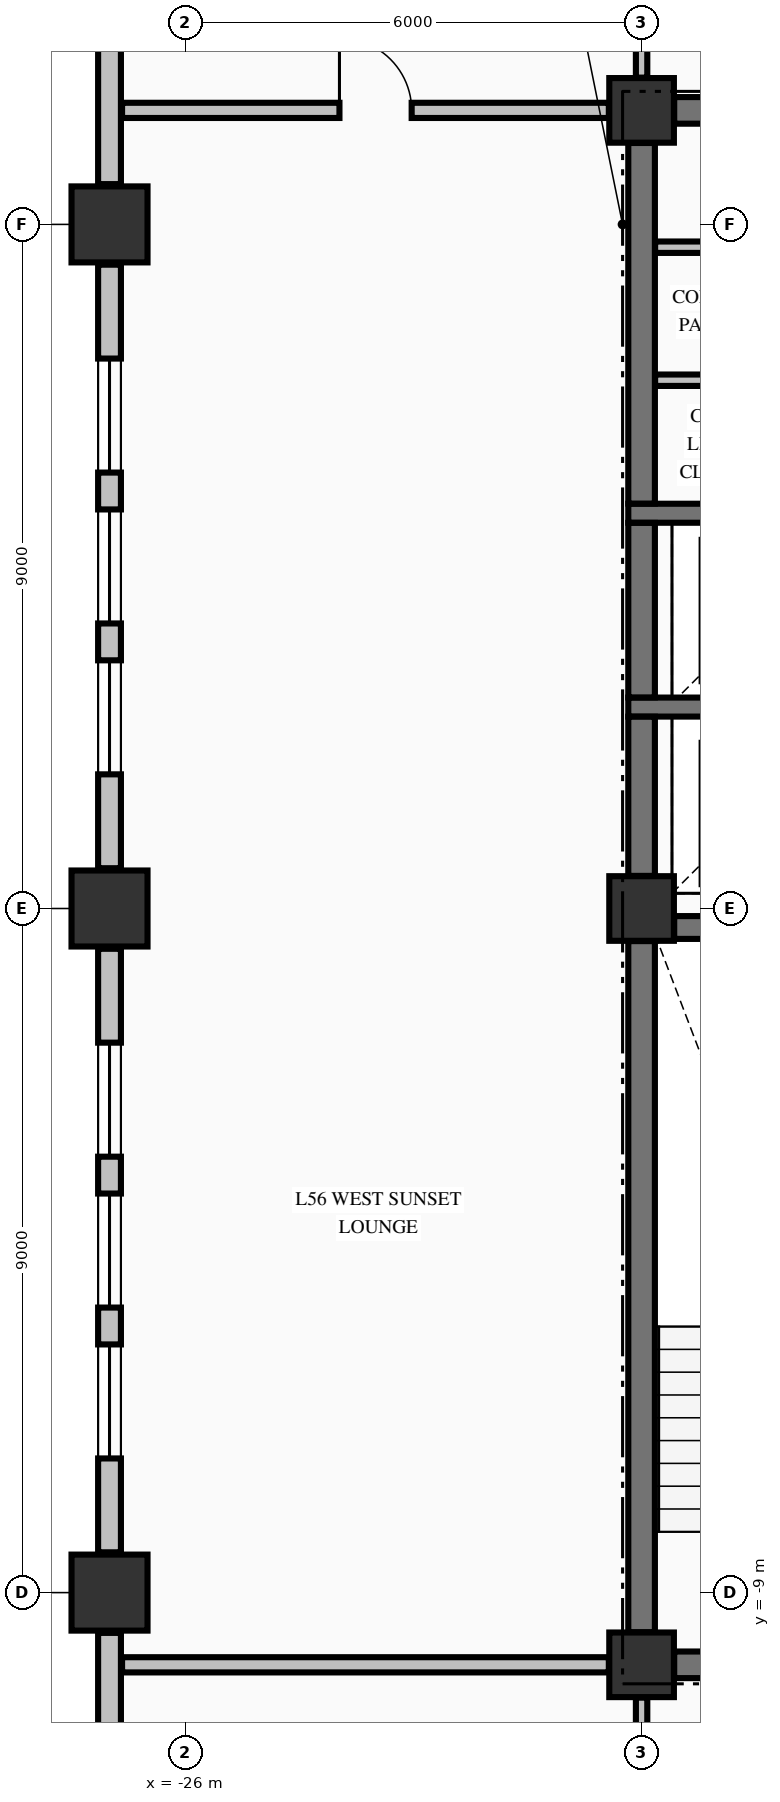
"""IFC4 building model, lengths in metres.
Left out: names, types, materials, properties, quantities, classifications, styles, units other than length and angle.
Written with IfcOpenShell. Run it as: python <this file> out.ifc"""

import sys

from ifc_helpers import new_model, si_unit, direction, frame, frame_2d, origin, origin_2d, place, context, subcontext, project, spatial, rectangle, extrude, element, fill, save


model = new_model("IFC4")
c1 = context("Model", 3, precision=1e-05, world=origin(), true_north=direction((0.0, 1.0)))
c2 = subcontext(c1, "Body", "Model", "MODEL_VIEW")
j1 = project(units=[si_unit("LENGTHUNIT", "METRE"), si_unit("PLANEANGLEUNIT", "RADIAN")], contexts=[c1])
p1 = place(None, origin())
s1 = spatial("IfcSite", under=j1, at=p1, CompositionType="ELEMENT")
p2 = place(p1, origin())
s2 = spatial("IfcBuilding", under=s1, at=p2, CompositionType="ELEMENT")
p3 = place(p2, frame((0.0, 0.0, 215.26)))
s3 = spatial("IfcBuildingStorey", under=s2, at=p3, CompositionType="ELEMENT", Elevation=215.26)
for number, where, z_axis, x_axis in (
    (1, (-27.0, -9.0, -0.25), (0.0, 0.0, 1.0), (1.0, 0.0, 0.0)),
    (2, (-27.0, 0.0, -0.25), (0.0, 0.0, 1.0), (1.0, 0.0, 0.0)),
    (3, (-27.0, 9.0, -0.25), (0.0, 0.0, 1.0), (1.0, 0.0, 0.0)),
):
    element("IfcColumn", number, at=place(p3, frame(where, z_axis=z_axis, x_axis=x_axis)), inside=s3, PredefinedType="COLUMN", context=c2, shape_type="SweptSolid", body=[
        extrude(rectangle(XDim=1.0, YDim=1.0, at=origin_2d()), origin(), (0.0, 0.0, 1.0), 3.4),
    ])
for number, where, z_axis, x_axis in (
    (4, (-20.0, -9.95, -0.25), (0.0, 0.0, 1.0), (1.0, 0.0, 0.0)),
    (5, (-20.0, 10.5, -0.25), (0.0, 0.0, 1.0), (1.0, 0.0, 0.0)),
    (6, (-20.0, 0.0, -0.25), (0.0, 0.0, 1.0), (1.0, 0.0, 0.0)),
):
    element("IfcColumn", number, at=place(p3, frame(where, z_axis=z_axis, x_axis=x_axis)), inside=s3, PredefinedType="COLUMN", context=c2, shape_type="SweptSolid", body=[
        extrude(rectangle(XDim=0.85, YDim=0.85, at=origin_2d()), origin(), (0.0, 0.0, 1.0), 3.4),
    ])
p4 = place(p3, frame((-27.0, -9.53, 0.0), z_axis=(0.0, 0.0, 1.0), x_axis=(0.0, -1.0, 0.0)))
e7 = element("IfcWall", 7, at=p4, inside=s3, PredefinedType="STANDARD", context=c2, shape_type="SweptSolid", body=[
    extrude(rectangle(XDim=9.44, YDim=0.3, at=frame_2d((4.72, 0.0))), origin(), (0.0, 0.0, 1.0), 2.542),
])
p5 = place(p3, frame((-27.0, -0.53, 0.0), z_axis=(0.0, 0.0, 1.0), x_axis=(0.0, -1.0, 0.0)))
e8 = element("IfcWall", 8, at=p5, inside=s3, PredefinedType="STANDARD", context=c2, shape_type="SweptSolid", body=[
    extrude(rectangle(XDim=7.94, YDim=0.3, at=frame_2d((3.97, 0.0))), origin(), (0.0, 0.0, 1.0), 2.542),
])
p6 = place(p5, frame((1.235, 0.0, 0.72)))
e9 = element("IfcOpeningElement", 9, at=p6, cuts=e8, PredefinedType="OPENING", context=c2, shape_type="SweptSolid", body=[
    extrude(rectangle(XDim=1.5, YDim=1.6, at=frame_2d((0.75, 0.8))), frame((0.0, 0.16, 0.0), z_axis=(0.0, -1.0, 0.0), x_axis=(1.0, 0.0, 0.0)), (0.0, 0.0, 1.0), 0.32),
])
p7 = place(p5, frame((3.22, 0.0, 0.72)))
e10 = element("IfcOpeningElement", 10, at=p7, cuts=e8, PredefinedType="OPENING", context=c2, shape_type="SweptSolid", body=[
    extrude(rectangle(XDim=1.5, YDim=1.6, at=frame_2d((0.75, 0.8))), frame((0.0, 0.16, 0.0), z_axis=(0.0, -1.0, 0.0), x_axis=(1.0, 0.0, 0.0)), (0.0, 0.0, 1.0), 0.32),
])
p8 = place(p5, frame((5.205, 0.0, 0.72)))
e11 = element("IfcOpeningElement", 11, at=p8, cuts=e8, PredefinedType="OPENING", context=c2, shape_type="SweptSolid", body=[
    extrude(rectangle(XDim=1.5, YDim=1.6, at=frame_2d((0.75, 0.8))), frame((0.0, 0.16, 0.0), z_axis=(0.0, -1.0, 0.0), x_axis=(1.0, 0.0, 0.0)), (0.0, 0.0, 1.0), 0.32),
])
p9 = place(p3, frame((-27.0, 8.47, 0.0), z_axis=(0.0, 0.0, 1.0), x_axis=(0.0, -1.0, 0.0)))
e12 = element("IfcWall", 12, at=p9, inside=s3, PredefinedType="STANDARD", context=c2, shape_type="SweptSolid", body=[
    extrude(rectangle(XDim=7.94, YDim=0.3, at=frame_2d((3.97, 0.0))), origin(), (0.0, 0.0, 1.0), 2.542),
])
p10 = place(p9, frame((1.235, 0.0, 0.72)))
e13 = element("IfcOpeningElement", 13, at=p10, cuts=e12, PredefinedType="OPENING", context=c2, shape_type="SweptSolid", body=[
    extrude(rectangle(XDim=1.5, YDim=1.6, at=frame_2d((0.75, 0.8))), frame((0.0, 0.16, 0.0), z_axis=(0.0, -1.0, 0.0), x_axis=(1.0, 0.0, 0.0)), (0.0, 0.0, 1.0), 0.32),
])
p11 = place(p9, frame((3.22, 0.0, 0.72)))
e14 = element("IfcOpeningElement", 14, at=p11, cuts=e12, PredefinedType="OPENING", context=c2, shape_type="SweptSolid", body=[
    extrude(rectangle(XDim=1.5, YDim=1.6, at=frame_2d((0.75, 0.8))), frame((0.0, 0.16, 0.0), z_axis=(0.0, -1.0, 0.0), x_axis=(1.0, 0.0, 0.0)), (0.0, 0.0, 1.0), 0.32),
])
p12 = place(p9, frame((5.205, 0.0, 0.72)))
e15 = element("IfcOpeningElement", 15, at=p12, cuts=e12, PredefinedType="OPENING", context=c2, shape_type="SweptSolid", body=[
    extrude(rectangle(XDim=1.5, YDim=1.6, at=frame_2d((0.75, 0.8))), frame((0.0, 0.16, 0.0), z_axis=(0.0, -1.0, 0.0), x_axis=(1.0, 0.0, 0.0)), (0.0, 0.0, 1.0), 0.32),
])
p13 = place(p3, frame((-27.0, 18.97, 0.0), z_axis=(0.0, 0.0, 1.0), x_axis=(0.0, -1.0, 0.0)))
e16 = element("IfcWall", 16, at=p13, inside=s3, PredefinedType="STANDARD", context=c2, shape_type="SweptSolid", body=[
    extrude(rectangle(XDim=9.44, YDim=0.3, at=frame_2d((4.72, 0.0))), origin(), (0.0, 0.0, 1.0), 2.542),
])
p14 = place(p3, frame((-19.571, -9.95, 0.0), z_axis=(0.0, 0.0, 1.0), x_axis=(1.0, 0.0, 0.0)))
e17 = element("IfcWall", 17, at=p14, inside=s3, PredefinedType="SHEAR", context=c2, shape_type="SweptSolid", body=[
    extrude(rectangle(XDim=4.871, YDim=0.35, at=frame_2d((2.436, 0.0))), origin(), (0.0, 0.0, 1.0), 3.15),
])
p15 = place(p14, frame((0.746, 0.0, 0.0)))
e18 = element("IfcOpeningElement", 18, at=p15, cuts=e17, PredefinedType="OPENING", context=c2, shape_type="SweptSolid", body=[
    extrude(rectangle(XDim=1.05, YDim=2.15, at=frame_2d((0.525, 1.075))), frame((0.0, 0.185, 0.0), z_axis=(0.0, -1.0, 0.0), x_axis=(1.0, 0.0, 0.0)), (0.0, 0.0, 1.0), 0.37),
])
p16 = place(p3, frame((-19.571, -0.25, 0.0), z_axis=(0.0, 0.0, 1.0), x_axis=(1.0, 0.0, 0.0)))
e19 = element("IfcWall", 19, at=p16, inside=s3, PredefinedType="SHEAR", context=c2, shape_type="SweptSolid", body=[
    extrude(rectangle(XDim=8.142, YDim=0.3, at=frame_2d((4.071, 0.0))), origin(), (0.0, 0.0, 1.0), 3.15),
])
p17 = place(p16, frame((5.871, 0.0, 0.0)))
e20 = element("IfcOpeningElement", 20, at=p17, cuts=e19, PredefinedType="OPENING", context=c2, shape_type="SweptSolid", body=[
    extrude(rectangle(XDim=1.1, YDim=2.15, at=frame_2d((0.55, 1.075))), frame((0.0, 0.16, 0.0), z_axis=(0.0, -1.0, 0.0), x_axis=(1.0, 0.0, 0.0)), (0.0, 0.0, 1.0), 0.32),
])
for number, where, z_axis, x_axis in (
    (21, (-20.175, 2.65, 0.0), (0.0, 0.0, 1.0), (1.0, 0.0, 0.0)),
    (22, (-20.175, 5.2, 0.0), (0.0, 0.0, 1.0), (1.0, 0.0, 0.0)),
):
    element("IfcWall", number, at=place(p3, frame(where, z_axis=z_axis, x_axis=x_axis)), inside=s3, PredefinedType="SOLIDWALL", context=c2, shape_type="SweptSolid", body=[
        extrude(rectangle(XDim=3.2, YDim=0.25, at=frame_2d((1.6, 0.0))), origin(), (0.0, 0.0, 1.0), 3.15),
    ])
p18 = place(p3, frame((-19.571, 10.5, 0.0), z_axis=(0.0, 0.0, 1.0), x_axis=(1.0, 0.0, 0.0)))
e23 = element("IfcWall", 23, at=p18, inside=s3, PredefinedType="SHEAR", context=c2, shape_type="SweptSolid", body=[
    extrude(rectangle(XDim=4.871, YDim=0.35, at=frame_2d((2.436, 0.0))), origin(), (0.0, 0.0, 1.0), 3.15),
])
p19 = place(p18, frame((3.121, 0.0, 0.0)))
e24 = element("IfcOpeningElement", 24, at=p19, cuts=e23, PredefinedType="OPENING", context=c2, shape_type="SweptSolid", body=[
    extrude(rectangle(XDim=1.1, YDim=2.15, at=frame_2d((0.55, 1.075))), frame((0.0, 0.185, 0.0), z_axis=(0.0, -1.0, 0.0), x_axis=(1.0, 0.0, 0.0)), (0.0, 0.0, 1.0), 0.37),
])
p20 = place(p3, frame((-26.835, -9.95, 0.0), z_axis=(0.0, 0.0, 1.0), x_axis=(1.0, 0.0, 0.0)))
e25 = element("IfcWall", 25, at=p20, inside=s3, PredefinedType="PARTITIONING", context=c2, shape_type="SweptSolid", body=[
    extrude(rectangle(XDim=6.404, YDim=0.2, at=frame_2d((3.202, 0.0))), origin(), (0.0, 0.0, 1.0), 3.15),
])
for number, where, z_axis, x_axis in (
    (26, (-19.822, 6.95, 0.0), (0.0, 0.0, 1.0), (1.0, 0.0, 0.0)),
    (27, (-19.822, 8.7, 0.0), (0.0, 0.0, 1.0), (1.0, 0.0, 0.0)),
):
    element("IfcWall", number, at=place(p3, frame(where, z_axis=z_axis, x_axis=x_axis)), inside=s3, PredefinedType="PARTITIONING", context=c2, shape_type="SweptSolid", body=[
        extrude(rectangle(XDim=2.822, YDim=0.15, at=frame_2d((1.411, 0.0))), origin(), (0.0, 0.0, 1.0), 3.15),
    ])
p21 = place(p3, frame((-26.835, 10.5, 0.0), z_axis=(0.0, 0.0, 1.0), x_axis=(1.0, 0.0, 0.0)))
e28 = element("IfcWall", 28, at=p21, inside=s3, PredefinedType="PARTITIONING", context=c2, shape_type="SweptSolid", body=[
    extrude(rectangle(XDim=6.404, YDim=0.2, at=frame_2d((3.202, 0.0))), origin(), (0.0, 0.0, 1.0), 3.15),
])
p22 = place(p21, frame((2.86, 0.0, 0.0)))
e29 = element("IfcOpeningElement", 29, at=p22, cuts=e28, PredefinedType="OPENING", context=c2, shape_type="SweptSolid", body=[
    extrude(rectangle(XDim=0.95, YDim=2.15, at=frame_2d((0.475, 1.075))), frame((0.0, 0.11, 0.0), z_axis=(0.0, -1.0, 0.0), x_axis=(1.0, 0.0, 0.0)), (0.0, 0.0, 1.0), 0.22),
])
p23 = place(p3, frame((-20.0, -9.521, 0.0), z_axis=(0.0, 0.0, 1.0), x_axis=(0.0, 1.0, 0.0)))
e30 = element("IfcWall", 30, at=p23, inside=s3, PredefinedType="SHEAR", context=c2, shape_type="SweptSolid", body=[
    extrude(rectangle(XDim=9.092, YDim=0.35, at=frame_2d((4.546, 0.0))), origin(), (0.0, 0.0, 1.0), 3.15),
])
p24 = place(p3, frame((-20.0, 0.429, 0.0), z_axis=(0.0, 0.0, 1.0), x_axis=(0.0, 1.0, 0.0)))
e31 = element("IfcWall", 31, at=p24, inside=s3, PredefinedType="SHEAR", context=c2, shape_type="SweptSolid", body=[
    extrude(rectangle(XDim=2.094, YDim=0.35, at=frame_2d((1.047, 0.0))), origin(), (0.0, 0.0, 1.0), 3.15),
])
p25 = place(p3, frame((-20.0, 2.777, 0.0), z_axis=(0.0, 0.0, 1.0), x_axis=(0.0, 1.0, 0.0)))
e32 = element("IfcWall", 32, at=p25, inside=s3, PredefinedType="SHEAR", context=c2, shape_type="SweptSolid", body=[
    extrude(rectangle(XDim=2.296, YDim=0.35, at=frame_2d((1.148, 0.0))), origin(), (0.0, 0.0, 1.0), 3.15),
])
p26 = place(p3, frame((-20.0, 5.327, 0.0), z_axis=(0.0, 0.0, 1.0), x_axis=(0.0, 1.0, 0.0)))
e33 = element("IfcWall", 33, at=p26, inside=s3, PredefinedType="SHEAR", context=c2, shape_type="SweptSolid", body=[
    extrude(rectangle(XDim=4.744, YDim=0.35, at=frame_2d((2.372, 0.0))), origin(), (0.0, 0.0, 1.0), 3.15),
])
p27 = place(p3, frame((-20.0, -12.697, 0.0), z_axis=(0.0, 0.0, 1.0), x_axis=(0.0, 1.0, 0.0)))
e34 = element("IfcWall", 34, at=p27, inside=s3, PredefinedType="PARTITIONING", context=c2, shape_type="SweptSolid", body=[
    extrude(rectangle(XDim=2.316, YDim=0.15, at=frame_2d((1.158, 0.0))), origin(), (0.0, 0.0, 1.0), 2.342),
])
p28 = place(p3, frame((-20.0, 10.931, 0.0), z_axis=(0.0, 0.0, 1.0), x_axis=(0.0, 1.0, 0.0)))
e35 = element("IfcWall", 35, at=p28, inside=s3, PredefinedType="PARTITIONING", context=c2, shape_type="SweptSolid", body=[
    extrude(rectangle(XDim=2.316, YDim=0.15, at=frame_2d((1.158, 0.0))), origin(), (0.0, 0.0, 1.0), 2.342),
])
p29 = place(p28, frame((0.524, 0.0, 0.0)))
e36 = element("IfcOpeningElement", 36, at=p29, cuts=e35, PredefinedType="OPENING", context=c2, shape_type="SweptSolid", body=[
    extrude(rectangle(XDim=0.95, YDim=2.15, at=frame_2d((0.475, 1.075))), frame((0.0, 0.085, 0.0), z_axis=(0.0, -1.0, 0.0), x_axis=(1.0, 0.0, 0.0)), (0.0, 0.0, 1.0), 0.17),
])
p30 = place(p6, origin())
e37 = element("IfcWindow", 37, at=p30, inside=s3, PartitioningType="SINGLE_PANEL", PredefinedType="WINDOW", context=c2, shape_type="SweptSolid", body=[
    extrude(rectangle(XDim=1.5, YDim=1.6, at=frame_2d((0.75, 0.8))), frame((0.0, 0.03, 0.0), z_axis=(0.0, -1.0, 0.0), x_axis=(1.0, 0.0, 0.0)), (0.0, 0.0, 1.0), 0.06),
])
fill(e9, e37)
p31 = place(p7, origin())
e38 = element("IfcWindow", 38, at=p31, inside=s3, PartitioningType="SINGLE_PANEL", PredefinedType="WINDOW", context=c2, shape_type="SweptSolid", body=[
    extrude(rectangle(XDim=1.5, YDim=1.6, at=frame_2d((0.75, 0.8))), frame((0.0, 0.03, 0.0), z_axis=(0.0, -1.0, 0.0), x_axis=(1.0, 0.0, 0.0)), (0.0, 0.0, 1.0), 0.06),
])
fill(e10, e38)
p32 = place(p8, origin())
e39 = element("IfcWindow", 39, at=p32, inside=s3, PartitioningType="SINGLE_PANEL", PredefinedType="WINDOW", context=c2, shape_type="SweptSolid", body=[
    extrude(rectangle(XDim=1.5, YDim=1.6, at=frame_2d((0.75, 0.8))), frame((0.0, 0.03, 0.0), z_axis=(0.0, -1.0, 0.0), x_axis=(1.0, 0.0, 0.0)), (0.0, 0.0, 1.0), 0.06),
])
fill(e11, e39)
p33 = place(p10, origin())
e40 = element("IfcWindow", 40, at=p33, inside=s3, PartitioningType="SINGLE_PANEL", PredefinedType="WINDOW", context=c2, shape_type="SweptSolid", body=[
    extrude(rectangle(XDim=1.5, YDim=1.6, at=frame_2d((0.75, 0.8))), frame((0.0, 0.03, 0.0), z_axis=(0.0, -1.0, 0.0), x_axis=(1.0, 0.0, 0.0)), (0.0, 0.0, 1.0), 0.06),
])
fill(e13, e40)
p34 = place(p11, origin())
e41 = element("IfcWindow", 41, at=p34, inside=s3, PartitioningType="SINGLE_PANEL", PredefinedType="WINDOW", context=c2, shape_type="SweptSolid", body=[
    extrude(rectangle(XDim=1.5, YDim=1.6, at=frame_2d((0.75, 0.8))), frame((0.0, 0.03, 0.0), z_axis=(0.0, -1.0, 0.0), x_axis=(1.0, 0.0, 0.0)), (0.0, 0.0, 1.0), 0.06),
])
fill(e14, e41)
p35 = place(p12, origin())
e42 = element("IfcWindow", 42, at=p35, inside=s3, PartitioningType="SINGLE_PANEL", PredefinedType="WINDOW", context=c2, shape_type="SweptSolid", body=[
    extrude(rectangle(XDim=1.5, YDim=1.6, at=frame_2d((0.75, 0.8))), frame((0.0, 0.03, 0.0), z_axis=(0.0, -1.0, 0.0), x_axis=(1.0, 0.0, 0.0)), (0.0, 0.0, 1.0), 0.06),
])
fill(e15, e42)
p36 = place(p22, origin())
e43 = element("IfcDoor", 43, at=p36, inside=s3, OperationType="SINGLE_SWING_LEFT", PredefinedType="DOOR", context=c2, shape_type="SweptSolid", body=[
    extrude(rectangle(XDim=0.95, YDim=2.15, at=frame_2d((0.475, 1.075))), frame((0.0, 0.025, 0.0), z_axis=(0.0, -1.0, 0.0), x_axis=(1.0, 0.0, 0.0)), (0.0, 0.0, 1.0), 0.05),
])
fill(e29, e43)
save(model, sys.argv[1])
